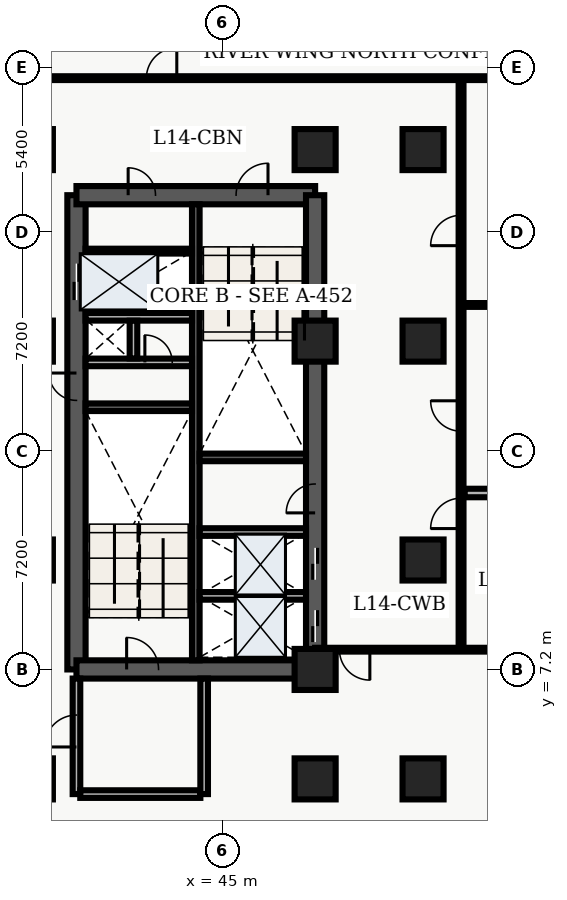
"""IFC4 building model, lengths in metres.
Left out: names, types, materials, properties, quantities, classifications, styles, units other than length and angle.
Written with IfcOpenShell. Run it as: python <this file> out.ifc"""

import sys

from ifc_helpers import new_model, entity, si_unit, converted_unit, direction, frame, origin_with_axes, origin_2d_with_axis, place, context, subcontext, project, spatial, polyline, rectangle, outline, extrude, element, fill, save


model = new_model("IFC4")
c1 = context("Model", 3, precision=1e-05, world=origin_with_axes(), true_north=direction((0.0, 1.0)))
c2 = subcontext(c1, "Body", "Model", "MODEL_VIEW")
j1 = project(units=[si_unit("LENGTHUNIT", "METRE"), converted_unit("PLANEANGLEUNIT", "DEGREE", entity("IfcPlaneAngleMeasure", 0.017), si_unit("PLANEANGLEUNIT", "RADIAN"), dimensions=[0, 0, 0, 0, 0, 0, 0])], contexts=[c1])
p1 = place(None, origin_with_axes())
s1 = spatial("IfcSite", under=j1, at=p1, CompositionType="ELEMENT")
p2 = place(p1, origin_with_axes())
s2 = spatial("IfcBuilding", under=s1, at=p2, CompositionType="ELEMENT")
p3 = place(p2, frame((0.0, 0.0, 60.0), z_axis=(0.0, 0.0, 1.0), x_axis=(1.0, 0.0, 0.0)))
s3 = spatial("IfcBuildingStorey", under=s2, at=p3, CompositionType="ELEMENT", Elevation=60.0)
p4 = place(p3, frame((40.2, 7.2, 0.0), z_axis=(0.0, 0.0, 1.0), x_axis=(0.0, 1.0, 0.0)))
e1 = element("IfcWall", 1, at=p4, inside=s3, PredefinedType="SHEAR", context=c2, shape_type="SweptSolid", body=[
    extrude(outline(polyline([(0.0, -0.3), (15.6, -0.3), (15.6, 0.3), (0.0, 0.3), (0.0, -0.3)])), origin_with_axes(), (0.0, 0.0, 1.0), 3.66),
])
p5 = place(p4, frame((12.75, 0.0, 0.0), z_axis=(0.0, 0.0, 1.0), x_axis=(1.0, 0.0, 0.0)))
e2 = element("IfcOpeningElement", 2, at=p5, cuts=e1, PredefinedType="OPENING", context=c2, shape_type="SweptSolid", body=[
    extrude(rectangle(XDim=1.2, YDim=0.62, at=origin_2d_with_axis()), origin_with_axes(), (0.0, 0.0, 1.0), 2.15),
])
p6 = place(p4, frame((9.3, 0.0, 0.0), z_axis=(0.0, 0.0, 1.0), x_axis=(1.0, 0.0, 0.0)))
e3 = element("IfcOpeningElement", 3, at=p6, cuts=e1, PredefinedType="OPENING", context=c2, shape_type="SweptSolid", body=[
    extrude(rectangle(XDim=0.9, YDim=0.62, at=origin_2d_with_axis()), origin_with_axes(), (0.0, 0.0, 1.0), 2.15),
])
p7 = place(p3, frame((40.2, 7.2, 0.0), z_axis=(0.0, 0.0, 1.0), x_axis=(1.0, 0.0, 0.0)))
e4 = element("IfcWall", 4, at=p7, inside=s3, PredefinedType="SHEAR", context=c2, shape_type="SweptSolid", body=[
    extrude(outline(polyline([(0.0, -0.3), (7.85, -0.3), (7.85, 0.3), (0.0, 0.3), (0.0, -0.3)])), origin_with_axes(), (0.0, 0.0, 1.0), 3.66),
])
p8 = place(p7, frame((2.175, 0.0, 0.0), z_axis=(0.0, 0.0, 1.0), x_axis=(1.0, 0.0, 0.0)))
e5 = element("IfcOpeningElement", 5, at=p8, cuts=e4, PredefinedType="OPENING", context=c2, shape_type="SweptSolid", body=[
    extrude(rectangle(XDim=1.05, YDim=0.62, at=origin_2d_with_axis()), origin_with_axes(), (0.0, 0.0, 1.0), 2.15),
])
p9 = place(p3, frame((40.2, 22.8, 0.0), z_axis=(0.0, 0.0, 1.0), x_axis=(1.0, 0.0, 0.0)))
e6 = element("IfcWall", 6, at=p9, inside=s3, PredefinedType="SHEAR", context=c2, shape_type="SweptSolid", body=[
    extrude(outline(polyline([(0.0, -0.3), (7.85, -0.3), (7.85, 0.3), (0.0, 0.3), (0.0, -0.3)])), origin_with_axes(), (0.0, 0.0, 1.0), 3.66),
])
p10 = place(p9, frame((5.775, 0.0, 0.0), z_axis=(0.0, 0.0, 1.0), x_axis=(1.0, 0.0, 0.0)))
e7 = element("IfcOpeningElement", 7, at=p10, cuts=e6, PredefinedType="OPENING", context=c2, shape_type="SweptSolid", body=[
    extrude(rectangle(XDim=1.05, YDim=0.62, at=origin_2d_with_axis()), origin_with_axes(), (0.0, 0.0, 1.0), 2.15),
])
p11 = place(p9, frame((2.15, 0.0, 0.0), z_axis=(0.0, 0.0, 1.0), x_axis=(1.0, 0.0, 0.0)))
e8 = element("IfcOpeningElement", 8, at=p11, cuts=e6, PredefinedType="OPENING", context=c2, shape_type="SweptSolid", body=[
    extrude(rectangle(XDim=0.9, YDim=0.62, at=origin_2d_with_axis()), origin_with_axes(), (0.0, 0.0, 1.0), 2.15),
])
p12 = place(p3, frame((48.05, 7.2, 0.0), z_axis=(0.0, 0.0, 1.0), x_axis=(0.0, 1.0, 0.0)))
e9 = element("IfcWall", 9, at=p12, inside=s3, PredefinedType="SHEAR", context=c2, shape_type="SweptSolid", body=[
    extrude(outline(polyline([(0.0, -0.3), (15.6, -0.3), (15.6, 0.3), (0.0, 0.3), (0.0, -0.3)])), origin_with_axes(), (0.0, 0.0, 1.0), 3.66),
])
p13 = place(p12, frame((1.425, 0.0, 0.0), z_axis=(0.0, 0.0, 1.0), x_axis=(1.0, 0.0, 0.0)))
e10 = element("IfcOpeningElement", 10, at=p13, cuts=e9, PredefinedType="OPENING", context=c2, shape_type="SweptSolid", body=[
    extrude(rectangle(XDim=1.05, YDim=0.62, at=origin_2d_with_axis()), origin_with_axes(), (0.0, 0.0, 1.0), 2.15),
])
p14 = place(p12, frame((3.475, 0.0, 0.0), z_axis=(0.0, 0.0, 1.0), x_axis=(1.0, 0.0, 0.0)))
e11 = element("IfcOpeningElement", 11, at=p14, cuts=e9, PredefinedType="OPENING", context=c2, shape_type="SweptSolid", body=[
    extrude(rectangle(XDim=1.05, YDim=0.62, at=origin_2d_with_axis()), origin_with_axes(), (0.0, 0.0, 1.0), 2.15),
])
p15 = place(p12, frame((5.625, 0.0, 0.0), z_axis=(0.0, 0.0, 1.0), x_axis=(1.0, 0.0, 0.0)))
e12 = element("IfcOpeningElement", 12, at=p15, cuts=e9, PredefinedType="OPENING", context=c2, shape_type="SweptSolid", body=[
    extrude(rectangle(XDim=0.95, YDim=0.62, at=origin_2d_with_axis()), origin_with_axes(), (0.0, 0.0, 1.0), 2.15),
])
p16 = place(p3, frame((44.125, 7.5, 0.0), z_axis=(0.0, 0.0, 1.0), x_axis=(0.0, 1.0, 0.0)))
e13 = element("IfcWall", 13, at=p16, inside=s3, PredefinedType="SHEAR", context=c2, shape_type="SweptSolid", body=[
    extrude(outline(polyline([(0.0, -0.125), (15.0, -0.125), (15.0, 0.125), (0.0, 0.125), (0.0, -0.125)])), origin_with_axes(), (0.0, 0.0, 1.0), 3.66),
])
for number, where, z_axis, x_axis in (
    (14, (40.5, 15.825, 0.0), (0.0, 0.0, 1.0), (1.0, 0.0, 0.0)),
    (15, (44.25, 14.175, 0.0), (0.0, 0.0, 1.0), (1.0, 0.0, 0.0)),
):
    element("IfcWall", number, at=place(p3, frame(where, z_axis=z_axis, x_axis=x_axis)), inside=s3, PredefinedType="SHEAR", context=c2, shape_type="SweptSolid", body=[
        extrude(outline(polyline([(0.0, -0.125), (3.5, -0.125), (3.5, 0.125), (0.0, 0.125), (0.0, -0.125)])), origin_with_axes(), (0.0, 0.0, 1.0), 3.66),
    ])
p17 = place(p3, frame((40.5, 17.3, 0.0), z_axis=(0.0, 0.0, 1.0), x_axis=(1.0, 0.0, 0.0)))
e16 = element("IfcWall", 16, at=p17, inside=s3, PredefinedType="SOLIDWALL", context=c2, shape_type="SweptSolid", body=[
    extrude(outline(polyline([(0.0, -0.125), (3.5, -0.125), (3.5, 0.125), (0.0, 0.125), (0.0, -0.125)])), origin_with_axes(), (0.0, 0.0, 1.0), 2.7),
])
p18 = place(p17, frame((2.4, 0.0, 0.0), z_axis=(0.0, 0.0, 1.0), x_axis=(1.0, 0.0, 0.0)))
e17 = element("IfcOpeningElement", 17, at=p18, cuts=e16, PredefinedType="OPENING", context=c2, shape_type="SweptSolid", body=[
    extrude(rectangle(XDim=0.9, YDim=0.27, at=origin_2d_with_axis()), origin_with_axes(), (0.0, 0.0, 1.0), 2.15),
])
p19 = place(p3, frame((40.5, 18.8, 0.0), z_axis=(0.0, 0.0, 1.0), x_axis=(1.0, 0.0, 0.0)))
e18 = element("IfcWall", 18, at=p19, inside=s3, PredefinedType="SOLIDWALL", context=c2, shape_type="SweptSolid", body=[
    extrude(outline(polyline([(0.0, -0.125), (3.5, -0.125), (3.5, 0.125), (0.0, 0.125), (0.0, -0.125)])), origin_with_axes(), (0.0, 0.0, 1.0), 2.7),
])
p20 = place(p3, frame((42.075, 17.43, 0.0), z_axis=(0.0, 0.0, 1.0), x_axis=(0.0, 1.0, 0.0)))
e19 = element("IfcWall", 19, at=p20, inside=s3, PredefinedType="SOLIDWALL", context=c2, shape_type="SweptSolid", body=[
    extrude(outline(polyline([(0.0, -0.125), (1.24, -0.125), (1.24, 0.125), (0.0, 0.125), (0.0, -0.125)])), origin_with_axes(), (0.0, 0.0, 1.0), 2.7),
])
p21 = place(p3, frame((40.2, 3.1, 0.0), z_axis=(0.0, 0.0, 1.0), x_axis=(0.0, 1.0, 0.0)))
e20 = element("IfcWall", 20, at=p21, inside=s3, PredefinedType="SOLIDWALL", context=c2, shape_type="SweptSolid", body=[
    extrude(outline(polyline([(0.0, -0.125), (3.8, -0.125), (3.8, 0.125), (0.0, 0.125), (0.0, -0.125)])), origin_with_axes(), (0.0, 0.0, 1.0), 2.7),
])
p22 = place(p21, frame((2.075, 0.0, 0.0), z_axis=(0.0, 0.0, 1.0), x_axis=(1.0, 0.0, 0.0)))
e21 = element("IfcOpeningElement", 21, at=p22, cuts=e20, PredefinedType="OPENING", context=c2, shape_type="SweptSolid", body=[
    extrude(rectangle(XDim=1.05, YDim=0.27, at=origin_2d_with_axis()), origin_with_axes(), (0.0, 0.0, 1.0), 2.15),
])
p23 = place(p3, frame((40.325, 3.1, 0.0), z_axis=(0.0, 0.0, 1.0), x_axis=(1.0, 0.0, 0.0)))
e22 = element("IfcWall", 22, at=p23, inside=s3, PredefinedType="SOLIDWALL", context=c2, shape_type="SweptSolid", body=[
    extrude(outline(polyline([(0.0, -0.125), (3.95, -0.125), (3.95, 0.125), (0.0, 0.125), (0.0, -0.125)])), origin_with_axes(), (0.0, 0.0, 1.0), 2.7),
])
p24 = place(p3, frame((44.4, 3.1, 0.0), z_axis=(0.0, 0.0, 1.0), x_axis=(0.0, 1.0, 0.0)))
e23 = element("IfcWall", 23, at=p24, inside=s3, PredefinedType="SOLIDWALL", context=c2, shape_type="SweptSolid", body=[
    extrude(outline(polyline([(0.0, -0.125), (3.8, -0.125), (3.8, 0.125), (0.0, 0.125), (0.0, -0.125)])), origin_with_axes(), (0.0, 0.0, 1.0), 2.7),
])
for number, where, z_axis, x_axis in (
    (24, (38.75, 3.6, 0.0), (0.0, 0.0, 1.0), (1.0, 0.0, 0.0)),
    (25, (38.75, 10.8, 0.0), (0.0, 0.0, 1.0), (1.0, 0.0, 0.0)),
    (26, (38.75, 18.0, 0.0), (0.0, 0.0, 1.0), (1.0, 0.0, 0.0)),
    (27, (38.75, 24.3, 0.0), (0.0, 0.0, 1.0), (1.0, 0.0, 0.0)),
    (28, (48.05, 3.6, 0.0), (0.0, 0.0, 1.0), (1.0, 0.0, 0.0)),
    (29, (48.05, 7.2, 0.0), (0.0, 0.0, 1.0), (1.0, 0.0, 0.0)),
    (30, (48.05, 18.0, 0.0), (0.0, 0.0, 1.0), (1.0, 0.0, 0.0)),
    (31, (48.05, 24.3, 0.0), (0.0, 0.0, 1.0), (1.0, 0.0, 0.0)),
    (32, (51.6, 3.6, 0.0), (0.0, 0.0, 1.0), (1.0, 0.0, 0.0)),
    (33, (51.6, 10.8, 0.0), (0.0, 0.0, 1.0), (1.0, 0.0, 0.0)),
    (34, (51.6, 18.0, 0.0), (0.0, 0.0, 1.0), (1.0, 0.0, 0.0)),
    (35, (51.6, 24.3, 0.0), (0.0, 0.0, 1.0), (1.0, 0.0, 0.0)),
):
    element("IfcColumn", number, at=place(p3, frame(where, z_axis=z_axis, x_axis=x_axis)), inside=s3, PredefinedType="COLUMN", context=c2, shape_type="SweptSolid", body=[
        extrude(rectangle(XDim=1.35, YDim=1.35, at=origin_2d_with_axis()), origin_with_axes(), (0.0, 0.0, 1.0), 3.9),
    ])
p25 = place(p3, frame((40.5, 20.96, 0.0), z_axis=(0.0, 0.0, 1.0), x_axis=(1.0, 0.0, 0.0)))
e36 = element("IfcWall", 36, at=p25, inside=s3, PredefinedType="PARTITIONING", context=c2, shape_type="SweptSolid", body=[
    extrude(outline(polyline([(0.0, -0.08), (3.5, -0.08), (3.5, 0.08), (0.0, 0.08), (0.0, -0.08)])), origin_with_axes(), (0.0, 0.0, 1.0), 2.7),
])
for number, where, z_axis, x_axis in (
    (37, (44.25, 9.62, 0.0), (0.0, 0.0, 1.0), (1.0, 0.0, 0.0)),
    (38, (44.25, 11.72, 0.0), (0.0, 0.0, 1.0), (1.0, 0.0, 0.0)),
):
    element("IfcWall", number, at=place(p3, frame(where, z_axis=z_axis, x_axis=x_axis)), inside=s3, PredefinedType="SOLIDWALL", context=c2, shape_type="SweptSolid", body=[
        extrude(outline(polyline([(0.0, -0.125), (3.5, -0.125), (3.5, 0.125), (0.0, 0.125), (0.0, -0.125)])), origin_with_axes(), (0.0, 0.0, 1.0), 2.7),
    ])
p26 = place(p3, frame((52.85, 7.85, 0.0), z_axis=(0.0, 0.0, 1.0), x_axis=(0.0, 1.0, 0.0)))
e39 = element("IfcWall", 39, at=p26, inside=s3, PredefinedType="PARTITIONING", context=c2, shape_type="SweptSolid", body=[
    extrude(outline(polyline([(0.0, -0.08), (18.8, -0.08), (18.8, 0.08), (0.0, 0.08), (0.0, -0.08)])), origin_with_axes(), (0.0, 0.0, 1.0), 2.7),
])
p27 = place(p26, frame((4.484, 0.0, 0.0), z_axis=(0.0, 0.0, 1.0), x_axis=(1.0, 0.0, 0.0)))
e40 = element("IfcOpeningElement", 40, at=p27, cuts=e39, PredefinedType="OPENING", context=c2, shape_type="SweptSolid", body=[
    extrude(rectangle(XDim=1.0, YDim=0.18, at=origin_2d_with_axis()), origin_with_axes(), (0.0, 0.0, 1.0), 2.15),
])
p28 = place(p26, frame((7.687, 0.0, 0.0), z_axis=(0.0, 0.0, 1.0), x_axis=(1.0, 0.0, 0.0)))
e41 = element("IfcOpeningElement", 41, at=p28, cuts=e39, PredefinedType="OPENING", context=c2, shape_type="SweptSolid", body=[
    extrude(rectangle(XDim=1.0, YDim=0.18, at=origin_2d_with_axis()), origin_with_axes(), (0.0, 0.0, 1.0), 2.15),
])
p29 = place(p26, frame((13.79, 0.0, 0.0), z_axis=(0.0, 0.0, 1.0), x_axis=(1.0, 0.0, 0.0)))
e42 = element("IfcOpeningElement", 42, at=p29, cuts=e39, PredefinedType="OPENING", context=c2, shape_type="SweptSolid", body=[
    extrude(rectangle(XDim=1.0, YDim=0.18, at=origin_2d_with_axis()), origin_with_axes(), (0.0, 0.0, 1.0), 2.15),
])
p30 = place(p3, frame((59.64, 7.85, 0.0), z_axis=(0.0, 0.0, 1.0), x_axis=(-1.0, 0.0, 0.0)))
e43 = element("IfcWall", 43, at=p30, inside=s3, PredefinedType="PARTITIONING", context=c2, shape_type="SweptSolid", body=[
    extrude(outline(polyline([(0.0, -0.062), (11.59, -0.062), (11.59, 0.062), (0.0, 0.062), (0.0, -0.062)])), origin_with_axes(), (0.0, 0.0, 1.0), 2.7),
])
p31 = place(p30, frame((10.29, 0.0, 0.0), z_axis=(0.0, 0.0, 1.0), x_axis=(1.0, 0.0, 0.0)))
e44 = element("IfcOpeningElement", 44, at=p31, cuts=e43, PredefinedType="OPENING", context=c2, shape_type="SweptSolid", body=[
    extrude(rectangle(XDim=1.0, YDim=0.145, at=origin_2d_with_axis()), origin_with_axes(), (0.0, 0.0, 1.0), 2.15),
])
p32 = place(p3, frame((38.76, 26.65, 0.0), z_axis=(0.0, 0.0, 1.0), x_axis=(1.0, 0.0, 0.0)))
e45 = element("IfcWall", 45, at=p32, inside=s3, PredefinedType="PARTITIONING", context=c2, shape_type="SweptSolid", body=[
    extrude(outline(polyline([(0.0, -0.062), (20.88, -0.062), (20.88, 0.062), (0.0, 0.062), (0.0, -0.062)])), origin_with_axes(), (0.0, 0.0, 1.0), 2.7),
])
p33 = place(p32, frame((4.24, 0.0, 0.0), z_axis=(0.0, 0.0, 1.0), x_axis=(1.0, 0.0, 0.0)))
e46 = element("IfcOpeningElement", 46, at=p33, cuts=e45, PredefinedType="OPENING", context=c2, shape_type="SweptSolid", body=[
    extrude(rectangle(XDim=1.0, YDim=0.145, at=origin_2d_with_axis()), origin_with_axes(), (0.0, 0.0, 1.0), 2.15),
])
p34 = place(p3, frame((52.97, 13.004, 0.0), z_axis=(0.0, 0.0, 1.0), x_axis=(1.0, 0.0, 0.0)))
e47 = element("IfcWall", 47, at=p34, inside=s3, PredefinedType="PARTITIONING", context=c2, shape_type="SweptSolid", body=[
    extrude(outline(polyline([(0.0, -0.14), (6.655, -0.14), (6.655, 0.14), (0.0, 0.14), (0.0, -0.14)])), origin_with_axes(), (0.0, 0.0, 1.0), 2.7),
])
p35 = place(p3, frame((52.97, 19.189, 0.0), z_axis=(0.0, 0.0, 1.0), x_axis=(1.0, 0.0, 0.0)))
e48 = element("IfcWall", 48, at=p35, inside=s3, PredefinedType="PARTITIONING", context=c2, shape_type="SweptSolid", body=[
    extrude(outline(polyline([(0.0, -0.062), (6.655, -0.062), (6.655, 0.062), (0.0, 0.062), (0.0, -0.062)])), origin_with_axes(), (0.0, 0.0, 1.0), 2.7),
])
p36 = place(p12, frame((1.425, 0.0, 0.0), z_axis=(0.0, 0.0, 1.0), x_axis=(1.0, 0.0, 0.0)))
e49 = element("IfcDoor", 49, at=p36, inside=s3, OperationType="SLIDING_TO_LEFT", PredefinedType="DOOR", context=c2, shape_type="SweptSolid", body=[
    extrude(rectangle(XDim=1.05, YDim=0.09, at=origin_2d_with_axis()), origin_with_axes(), (0.0, 0.0, 1.0), 2.15),
])
fill(e10, e49)
p37 = place(p12, frame((3.475, 0.0, 0.0), z_axis=(0.0, 0.0, 1.0), x_axis=(1.0, 0.0, 0.0)))
e50 = element("IfcDoor", 50, at=p37, inside=s3, OperationType="SLIDING_TO_RIGHT", PredefinedType="DOOR", context=c2, shape_type="SweptSolid", body=[
    extrude(rectangle(XDim=1.05, YDim=0.09, at=origin_2d_with_axis()), origin_with_axes(), (0.0, 0.0, 1.0), 2.15),
])
fill(e11, e50)
p38 = place(p4, frame((12.75, 0.0, 0.0), z_axis=(0.0, 0.0, 1.0), x_axis=(1.0, 0.0, 0.0)))
e51 = element("IfcDoor", 51, at=p38, inside=s3, OperationType="DOUBLE_DOOR_SLIDING", PredefinedType="DOOR", context=c2, shape_type="SweptSolid", body=[
    extrude(rectangle(XDim=1.2, YDim=0.09, at=origin_2d_with_axis()), origin_with_axes(), (0.0, 0.0, 1.0), 2.15),
])
fill(e2, e51)
p39 = place(p4, frame((9.3, 0.0, 0.0), z_axis=(0.0, 0.0, 1.0), x_axis=(1.0, 0.0, 0.0)))
e52 = element("IfcDoor", 52, at=p39, inside=s3, OperationType="SINGLE_SWING_RIGHT", PredefinedType="DOOR", context=c2, shape_type="SweptSolid", body=[
    extrude(rectangle(XDim=0.9, YDim=0.09, at=origin_2d_with_axis()), origin_with_axes(), (0.0, 0.0, 1.0), 2.15),
])
fill(e3, e52)
p40 = place(p17, frame((2.4, 0.0, 0.0), z_axis=(0.0, 0.0, 1.0), x_axis=(1.0, 0.0, 0.0)))
e53 = element("IfcDoor", 53, at=p40, inside=s3, OperationType="SINGLE_SWING_LEFT", PredefinedType="DOOR", context=c2, shape_type="SweptSolid", body=[
    extrude(rectangle(XDim=0.9, YDim=0.09, at=origin_2d_with_axis()), origin_with_axes(), (0.0, 0.0, 1.0), 2.15),
])
fill(e17, e53)
p41 = place(p7, frame((2.175, 0.0, 0.0), z_axis=(0.0, 0.0, 1.0), x_axis=(1.0, 0.0, 0.0)))
e54 = element("IfcDoor", 54, at=p41, inside=s3, OperationType="SINGLE_SWING_LEFT", PredefinedType="DOOR", context=c2, shape_type="SweptSolid", body=[
    extrude(rectangle(XDim=1.05, YDim=0.09, at=origin_2d_with_axis()), origin_with_axes(), (0.0, 0.0, 1.0), 2.15),
])
fill(e5, e54)
p42 = place(p9, frame((5.775, 0.0, 0.0), z_axis=(0.0, 0.0, 1.0), x_axis=(1.0, 0.0, 0.0)))
e55 = element("IfcDoor", 55, at=p42, inside=s3, OperationType="SINGLE_SWING_RIGHT", PredefinedType="DOOR", context=c2, shape_type="SweptSolid", body=[
    extrude(rectangle(XDim=1.05, YDim=0.09, at=origin_2d_with_axis()), origin_with_axes(), (0.0, 0.0, 1.0), 2.15),
])
fill(e7, e55)
p43 = place(p21, frame((2.075, 0.0, 0.0), z_axis=(0.0, 0.0, 1.0), x_axis=(1.0, 0.0, 0.0)))
e56 = element("IfcDoor", 56, at=p43, inside=s3, OperationType="SINGLE_SWING_LEFT", PredefinedType="DOOR", context=c2, shape_type="SweptSolid", body=[
    extrude(rectangle(XDim=1.05, YDim=0.09, at=origin_2d_with_axis()), origin_with_axes(), (0.0, 0.0, 1.0), 2.15),
])
fill(e21, e56)
p44 = place(p9, frame((2.15, 0.0, 0.0), z_axis=(0.0, 0.0, 1.0), x_axis=(1.0, 0.0, 0.0)))
e57 = element("IfcDoor", 57, at=p44, inside=s3, OperationType="SINGLE_SWING_LEFT", PredefinedType="DOOR", context=c2, shape_type="SweptSolid", body=[
    extrude(rectangle(XDim=0.9, YDim=0.09, at=origin_2d_with_axis()), origin_with_axes(), (0.0, 0.0, 1.0), 2.15),
])
fill(e8, e57)
p45 = place(p12, frame((5.625, 0.0, 0.0), z_axis=(0.0, 0.0, 1.0), x_axis=(1.0, 0.0, 0.0)))
e58 = element("IfcDoor", 58, at=p45, inside=s3, OperationType="SINGLE_SWING_LEFT", PredefinedType="DOOR", context=c2, shape_type="SweptSolid", body=[
    extrude(rectangle(XDim=0.95, YDim=0.09, at=origin_2d_with_axis()), origin_with_axes(), (0.0, 0.0, 1.0), 2.15),
])
fill(e12, e58)
p46 = place(p30, frame((10.29, 0.0, 0.0), z_axis=(0.0, 0.0, 1.0), x_axis=(1.0, 0.0, 0.0)))
e59 = element("IfcDoor", 59, at=p46, inside=s3, OperationType="SINGLE_SWING_LEFT", PredefinedType="DOOR", context=c2, shape_type="SweptSolid", body=[
    extrude(rectangle(XDim=1.0, YDim=0.075, at=origin_2d_with_axis()), origin_with_axes(), (0.0, 0.0, 1.0), 2.15),
])
fill(e44, e59)
p47 = place(p32, frame((4.24, 0.0, 0.0), z_axis=(0.0, 0.0, 1.0), x_axis=(1.0, 0.0, 0.0)))
e60 = element("IfcDoor", 60, at=p47, inside=s3, OperationType="SINGLE_SWING_RIGHT", PredefinedType="DOOR", context=c2, shape_type="SweptSolid", body=[
    extrude(rectangle(XDim=1.0, YDim=0.075, at=origin_2d_with_axis()), origin_with_axes(), (0.0, 0.0, 1.0), 2.15),
])
fill(e46, e60)
p48 = place(p26, frame((4.484, 0.0, 0.0), z_axis=(0.0, 0.0, 1.0), x_axis=(1.0, 0.0, 0.0)))
e61 = element("IfcDoor", 61, at=p48, inside=s3, OperationType="SINGLE_SWING_LEFT", PredefinedType="DOOR", context=c2, shape_type="SweptSolid", body=[
    extrude(rectangle(XDim=1.0, YDim=0.09, at=origin_2d_with_axis()), origin_with_axes(), (0.0, 0.0, 1.0), 2.15),
])
fill(e40, e61)
p49 = place(p26, frame((7.687, 0.0, 0.0), z_axis=(0.0, 0.0, 1.0), x_axis=(1.0, 0.0, 0.0)))
e62 = element("IfcDoor", 62, at=p49, inside=s3, OperationType="SINGLE_SWING_RIGHT", PredefinedType="DOOR", context=c2, shape_type="SweptSolid", body=[
    extrude(rectangle(XDim=1.0, YDim=0.09, at=origin_2d_with_axis()), origin_with_axes(), (0.0, 0.0, 1.0), 2.15),
])
fill(e41, e62)
p50 = place(p26, frame((13.79, 0.0, 0.0), z_axis=(0.0, 0.0, 1.0), x_axis=(1.0, 0.0, 0.0)))
e63 = element("IfcDoor", 63, at=p50, inside=s3, OperationType="SINGLE_SWING_LEFT", PredefinedType="DOOR", context=c2, shape_type="SweptSolid", body=[
    extrude(rectangle(XDim=1.0, YDim=0.09, at=origin_2d_with_axis()), origin_with_axes(), (0.0, 0.0, 1.0), 2.15),
])
fill(e42, e63)
save(model, sys.argv[1])
